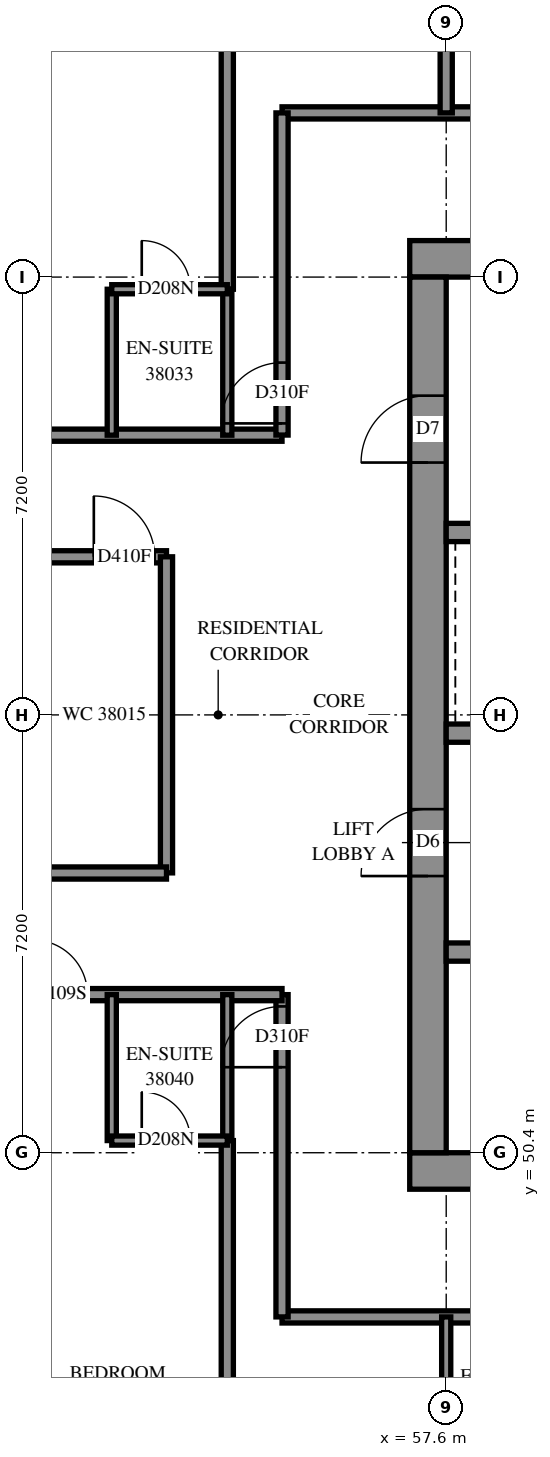
"""IFC4 building model, lengths in metres.
Left out: names, types, materials, properties, quantities, classifications, styles, units other than length and angle.
Written with IfcOpenShell. Run it as: python <this file> out.ifc"""

import sys

from ifc_helpers import new_model, si_unit, direction, frame, frame_2d, origin, place, context, subcontext, project, spatial, rectangle, extrude, element, fill, save


model = new_model("IFC4")
c1 = context("Model", 3, precision=1e-05, world=origin(), true_north=direction((0.0, 1.0)))
c2 = subcontext(c1, "Body", "Model", "MODEL_VIEW")
j1 = project(units=[si_unit("LENGTHUNIT", "METRE"), si_unit("PLANEANGLEUNIT", "RADIAN")], contexts=[c1])
p1 = place(None, origin())
s1 = spatial("IfcSite", under=j1, at=p1, CompositionType="ELEMENT")
p2 = place(p1, origin())
s2 = spatial("IfcBuilding", under=s1, at=p2, CompositionType="ELEMENT")
p3 = place(p2, frame((0.0, 0.0, 142.2)))
s3 = spatial("IfcBuildingStorey", under=s2, at=p3, CompositionType="ELEMENT", Elevation=142.2)
p4 = place(p3, frame((57.0, 50.1, -0.3), z_axis=(0.0, 0.0, 1.0), x_axis=(1.0, 0.0, 0.0)))
e1 = element("IfcWall", 1, at=p4, inside=s3, PredefinedType="SHEAR", context=c2, shape_type="SweptSolid", body=[
    extrude(rectangle(XDim=15.6, YDim=0.6, at=frame_2d((7.8, 0.0))), origin(), (0.0, 0.0, 1.0), 2.7),
])
p5 = place(p3, frame((57.0, 65.1, -0.3), z_axis=(0.0, 0.0, 1.0), x_axis=(1.0, 0.0, 0.0)))
e2 = element("IfcWall", 2, at=p5, inside=s3, PredefinedType="SHEAR", context=c2, shape_type="SweptSolid", body=[
    extrude(rectangle(XDim=15.6, YDim=0.6, at=frame_2d((7.8, 0.0))), origin(), (0.0, 0.0, 1.0), 2.7),
])
p6 = place(p5, frame((10.6, 0.0, 0.3)))
e3 = element("IfcOpeningElement", 3, at=p6, cuts=e2, PredefinedType="OPENING", context=c2, shape_type="SweptSolid", body=[
    extrude(rectangle(XDim=0.8, YDim=2.1, at=frame_2d((0.4, 1.05))), frame((0.0, 0.31, 0.0), z_axis=(0.0, -1.0, 0.0), x_axis=(1.0, 0.0, 0.0)), (0.0, 0.0, 1.0), 0.62),
])
p7 = place(p3, frame((57.3, 50.4, -0.3), z_axis=(0.0, 0.0, 1.0), x_axis=(0.0, 1.0, 0.0)))
e4 = element("IfcWall", 4, at=p7, inside=s3, PredefinedType="SHEAR", context=c2, shape_type="SweptSolid", body=[
    extrude(rectangle(XDim=14.4, YDim=0.6, at=frame_2d((7.2, 0.0))), origin(), (0.0, 0.0, 1.0), 2.7),
])
p8 = place(p7, frame((4.55, 0.0, 0.3)))
e5 = element("IfcOpeningElement", 5, at=p8, cuts=e4, PredefinedType="OPENING", context=c2, shape_type="SweptSolid", body=[
    extrude(rectangle(XDim=1.1, YDim=2.1, at=frame_2d((0.55, 1.05))), frame((0.0, 0.31, 0.0), z_axis=(0.0, -1.0, 0.0), x_axis=(1.0, 0.0, 0.0)), (0.0, 0.0, 1.0), 0.62),
])
p9 = place(p7, frame((11.35, 0.0, 0.3)))
e6 = element("IfcOpeningElement", 6, at=p9, cuts=e4, PredefinedType="OPENING", context=c2, shape_type="SweptSolid", body=[
    extrude(rectangle(XDim=1.1, YDim=2.1, at=frame_2d((0.55, 1.05))), frame((0.0, 0.31, 0.0), z_axis=(0.0, -1.0, 0.0), x_axis=(1.0, 0.0, 0.0)), (0.0, 0.0, 1.0), 0.62),
])
p10 = place(p3, frame((57.6, 53.7, 0.0), z_axis=(0.0, 0.0, 1.0), x_axis=(1.0, 0.0, 0.0)))
e7 = element("IfcWall", 7, at=p10, inside=s3, PredefinedType="SOLIDWALL", context=c2, shape_type="SweptSolid", body=[
    extrude(rectangle(XDim=14.4, YDim=0.3, at=frame_2d((7.2, 0.0))), origin(), (0.0, 0.0, 1.0), 3.1),
])
p11 = place(p10, frame((1.35, 0.0, 0.0)))
e8 = element("IfcOpeningElement", 8, at=p11, cuts=e7, PredefinedType="OPENING", context=c2, shape_type="SweptSolid", body=[
    extrude(rectangle(XDim=0.9, YDim=2.1, at=frame_2d((0.45, 1.05))), frame((0.0, 0.16, 0.0), z_axis=(0.0, -1.0, 0.0), x_axis=(1.0, 0.0, 0.0)), (0.0, 0.0, 1.0), 0.32),
])
p12 = place(p10, frame((4.95, 0.0, 0.0)))
e9 = element("IfcOpeningElement", 9, at=p12, cuts=e7, PredefinedType="OPENING", context=c2, shape_type="SweptSolid", body=[
    extrude(rectangle(XDim=0.9, YDim=2.1, at=frame_2d((0.45, 1.05))), frame((0.0, 0.16, 0.0), z_axis=(0.0, -1.0, 0.0), x_axis=(1.0, 0.0, 0.0)), (0.0, 0.0, 1.0), 0.32),
])
p13 = place(p10, frame((8.55, 0.0, 0.0)))
e10 = element("IfcOpeningElement", 10, at=p13, cuts=e7, PredefinedType="OPENING", context=c2, shape_type="SweptSolid", body=[
    extrude(rectangle(XDim=0.9, YDim=2.1, at=frame_2d((0.45, 1.05))), frame((0.0, 0.16, 0.0), z_axis=(0.0, -1.0, 0.0), x_axis=(1.0, 0.0, 0.0)), (0.0, 0.0, 1.0), 0.32),
])
p14 = place(p10, frame((12.05, 0.0, 0.0)))
e11 = element("IfcOpeningElement", 11, at=p14, cuts=e7, PredefinedType="OPENING", context=c2, shape_type="SweptSolid", body=[
    extrude(rectangle(XDim=1.1, YDim=2.1, at=frame_2d((0.55, 1.05))), frame((0.0, 0.16, 0.0), z_axis=(0.0, -1.0, 0.0), x_axis=(1.0, 0.0, 0.0)), (0.0, 0.0, 1.0), 0.32),
])
p15 = place(p3, frame((57.6, 57.3, 0.0), z_axis=(0.0, 0.0, 1.0), x_axis=(1.0, 0.0, 0.0)))
e12 = element("IfcWall", 12, at=p15, inside=s3, PredefinedType="SOLIDWALL", context=c2, shape_type="SweptSolid", body=[
    extrude(rectangle(XDim=14.4, YDim=0.3, at=frame_2d((7.2, 0.0))), origin(), (0.0, 0.0, 1.0), 3.1),
])
p16 = place(p15, frame((1.25, 0.0, 0.0)))
e13 = element("IfcOpeningElement", 13, at=p16, cuts=e12, PredefinedType="OPENING", context=c2, shape_type="SweptSolid", body=[
    extrude(rectangle(XDim=1.1, YDim=2.1, at=frame_2d((0.55, 1.05))), frame((0.0, 0.16, 0.0), z_axis=(0.0, -1.0, 0.0), x_axis=(1.0, 0.0, 0.0)), (0.0, 0.0, 1.0), 0.32),
])
p17 = place(p15, frame((4.85, 0.0, 0.0)))
e14 = element("IfcOpeningElement", 14, at=p17, cuts=e12, PredefinedType="OPENING", context=c2, shape_type="SweptSolid", body=[
    extrude(rectangle(XDim=1.1, YDim=2.1, at=frame_2d((0.55, 1.05))), frame((0.0, 0.16, 0.0), z_axis=(0.0, -1.0, 0.0), x_axis=(1.0, 0.0, 0.0)), (0.0, 0.0, 1.0), 0.32),
])
p18 = place(p15, frame((8.45, 0.0, 0.0)))
e15 = element("IfcOpeningElement", 15, at=p18, cuts=e12, PredefinedType="OPENING", context=c2, shape_type="SweptSolid", body=[
    extrude(rectangle(XDim=1.1, YDim=2.1, at=frame_2d((0.55, 1.05))), frame((0.0, 0.16, 0.0), z_axis=(0.0, -1.0, 0.0), x_axis=(1.0, 0.0, 0.0)), (0.0, 0.0, 1.0), 0.32),
])
p19 = place(p15, frame((12.05, 0.0, 0.0)))
e16 = element("IfcOpeningElement", 16, at=p19, cuts=e12, PredefinedType="OPENING", context=c2, shape_type="SweptSolid", body=[
    extrude(rectangle(XDim=1.1, YDim=2.1, at=frame_2d((0.55, 1.05))), frame((0.0, 0.16, 0.0), z_axis=(0.0, -1.0, 0.0), x_axis=(1.0, 0.0, 0.0)), (0.0, 0.0, 1.0), 0.32),
])
p20 = place(p3, frame((57.6, 60.6, 0.0), z_axis=(0.0, 0.0, 1.0), x_axis=(1.0, 0.0, 0.0)))
e17 = element("IfcWall", 17, at=p20, inside=s3, PredefinedType="SOLIDWALL", context=c2, shape_type="SweptSolid", body=[
    extrude(rectangle(XDim=7.2, YDim=0.3, at=frame_2d((3.6, 0.0))), origin(), (0.0, 0.0, 1.0), 3.1),
])
p21 = place(p3, frame((54.9, 67.5, 0.0), z_axis=(0.0, 0.0, 1.0), x_axis=(1.0, 0.0, 0.0)))
e18 = element("IfcWall", 18, at=p21, inside=s3, PredefinedType="PARTITIONING", context=c2, shape_type="SweptSolid", body=[
    extrude(rectangle(XDim=19.8, YDim=0.2, at=frame_2d((9.9, 0.0))), origin(), (0.0, 0.0, 1.0), 3.1),
])
p22 = place(p21, frame((6.586, 0.0, 0.0)))
e19 = element("IfcOpeningElement", 19, at=p22, cuts=e18, PredefinedType="OPENING", context=c2, shape_type="SweptSolid", body=[
    extrude(rectangle(XDim=1.0, YDim=2.1, at=frame_2d((0.5, 1.05))), frame((0.0, 0.11, 0.0), z_axis=(0.0, -1.0, 0.0), x_axis=(1.0, 0.0, 0.0)), (0.0, 0.0, 1.0), 0.22),
])
p23 = place(p21, frame((14.089, 0.0, 0.0)))
e20 = element("IfcOpeningElement", 20, at=p23, cuts=e18, PredefinedType="OPENING", context=c2, shape_type="SweptSolid", body=[
    extrude(rectangle(XDim=1.0, YDim=2.1, at=frame_2d((0.5, 1.05))), frame((0.0, 0.11, 0.0), z_axis=(0.0, -1.0, 0.0), x_axis=(1.0, 0.0, 0.0)), (0.0, 0.0, 1.0), 0.22),
])
p24 = place(p3, frame((54.9, 47.7, 0.0), z_axis=(0.0, 0.0, 1.0), x_axis=(1.0, 0.0, 0.0)))
e21 = element("IfcWall", 21, at=p24, inside=s3, PredefinedType="PARTITIONING", context=c2, shape_type="SweptSolid", body=[
    extrude(rectangle(XDim=19.326, YDim=0.2, at=frame_2d((9.663, 0.0))), origin(), (0.0, 0.0, 1.0), 3.1),
])
p25 = place(p24, frame((5.0, 0.0, 0.0)))
e22 = element("IfcOpeningElement", 22, at=p25, cuts=e21, PredefinedType="OPENING", context=c2, shape_type="SweptSolid", body=[
    extrude(rectangle(XDim=0.9, YDim=2.1, at=frame_2d((0.45, 1.05))), frame((0.0, 0.11, 0.0), z_axis=(0.0, -1.0, 0.0), x_axis=(1.0, 0.0, 0.0)), (0.0, 0.0, 1.0), 0.22),
])
p26 = place(p24, frame((12.2, 0.0, 0.0)))
e23 = element("IfcOpeningElement", 23, at=p26, cuts=e21, PredefinedType="OPENING", context=c2, shape_type="SweptSolid", body=[
    extrude(rectangle(XDim=0.9, YDim=2.1, at=frame_2d((0.45, 1.05))), frame((0.0, 0.11, 0.0), z_axis=(0.0, -1.0, 0.0), x_axis=(1.0, 0.0, 0.0)), (0.0, 0.0, 1.0), 0.22),
])
p27 = place(p24, frame((6.7, 0.0, 0.0)))
e24 = element("IfcOpeningElement", 24, at=p27, cuts=e21, PredefinedType="OPENING", context=c2, shape_type="SweptSolid", body=[
    extrude(rectangle(XDim=0.9, YDim=2.1, at=frame_2d((0.45, 1.05))), frame((0.0, 0.11, 0.0), z_axis=(0.0, -1.0, 0.0), x_axis=(1.0, 0.0, 0.0)), (0.0, 0.0, 1.0), 0.22),
])
p28 = place(p24, frame((13.9, 0.0, 0.0)))
e25 = element("IfcOpeningElement", 25, at=p28, cuts=e21, PredefinedType="OPENING", context=c2, shape_type="SweptSolid", body=[
    extrude(rectangle(XDim=0.9, YDim=2.1, at=frame_2d((0.45, 1.05))), frame((0.0, 0.11, 0.0), z_axis=(0.0, -1.0, 0.0), x_axis=(1.0, 0.0, 0.0)), (0.0, 0.0, 1.0), 0.22),
])
p29 = place(p3, frame((36.0, 60.2, 0.0), z_axis=(0.0, 0.0, 1.0), x_axis=(1.0, 0.0, 0.0)))
e26 = element("IfcWall", 26, at=p29, inside=s3, PredefinedType="PARTITIONING", context=c2, shape_type="SweptSolid", body=[
    extrude(rectangle(XDim=17.0, YDim=0.2, at=frame_2d((8.5, 0.0))), origin(), (0.0, 0.0, 1.0), 3.1),
])
p30 = place(p29, frame((15.805, 0.0, 0.0)))
e27 = element("IfcOpeningElement", 27, at=p30, cuts=e26, PredefinedType="OPENING", context=c2, shape_type="SweptSolid", body=[
    extrude(rectangle(XDim=1.0, YDim=2.1, at=frame_2d((0.5, 1.05))), frame((0.0, 0.11, 0.0), z_axis=(0.0, -1.0, 0.0), x_axis=(1.0, 0.0, 0.0)), (0.0, 0.0, 1.0), 0.22),
])
p31 = place(p29, frame((4.125, 0.0, 0.0)))
e28 = element("IfcOpeningElement", 28, at=p31, cuts=e26, PredefinedType="OPENING", context=c2, shape_type="SweptSolid", body=[
    extrude(rectangle(XDim=1.0, YDim=2.1, at=frame_2d((0.5, 1.05))), frame((0.0, 0.11, 0.0), z_axis=(0.0, -1.0, 0.0), x_axis=(1.0, 0.0, 0.0)), (0.0, 0.0, 1.0), 0.22),
])
p32 = place(p29, frame((7.55, 0.0, 0.0)))
e29 = element("IfcOpeningElement", 29, at=p32, cuts=e26, PredefinedType="OPENING", context=c2, shape_type="SweptSolid", body=[
    extrude(rectangle(XDim=0.9, YDim=2.1, at=frame_2d((0.45, 1.05))), frame((0.0, 0.11, 0.0), z_axis=(0.0, -1.0, 0.0), x_axis=(1.0, 0.0, 0.0)), (0.0, 0.0, 1.0), 0.22),
])
p33 = place(p29, frame((11.635, 0.0, 0.0)))
e30 = element("IfcOpeningElement", 30, at=p33, cuts=e26, PredefinedType="OPENING", context=c2, shape_type="SweptSolid", body=[
    extrude(rectangle(XDim=1.0, YDim=2.1, at=frame_2d((0.5, 1.05))), frame((0.0, 0.11, 0.0), z_axis=(0.0, -1.0, 0.0), x_axis=(1.0, 0.0, 0.0)), (0.0, 0.0, 1.0), 0.22),
])
p34 = place(p3, frame((40.602, 62.2, 0.0), z_axis=(0.0, 0.0, 1.0), x_axis=(1.0, 0.0, 0.0)))
e31 = element("IfcWall", 31, at=p34, inside=s3, PredefinedType="PARTITIONING", context=c2, shape_type="SweptSolid", body=[
    extrude(rectangle(XDim=14.298, YDim=0.2, at=frame_2d((7.149, 0.0))), origin(), (0.0, 0.0, 1.0), 3.1),
])
p35 = place(p34, frame((1.306, 0.0, 0.0)))
e32 = element("IfcOpeningElement", 32, at=p35, cuts=e31, PredefinedType="OPENING", context=c2, shape_type="SweptSolid", body=[
    extrude(rectangle(XDim=0.9, YDim=2.1, at=frame_2d((0.45, 1.05))), frame((0.0, 0.11, 0.0), z_axis=(0.0, -1.0, 0.0), x_axis=(1.0, 0.0, 0.0)), (0.0, 0.0, 1.0), 0.22),
])
p36 = place(p34, frame((8.455, 0.0, 0.0)))
e33 = element("IfcOpeningElement", 33, at=p36, cuts=e31, PredefinedType="OPENING", context=c2, shape_type="SweptSolid", body=[
    extrude(rectangle(XDim=0.9, YDim=2.1, at=frame_2d((0.45, 1.05))), frame((0.0, 0.11, 0.0), z_axis=(0.0, -1.0, 0.0), x_axis=(1.0, 0.0, 0.0)), (0.0, 0.0, 1.0), 0.22),
])
p37 = place(p3, frame((54.0, 42.357, 0.0), z_axis=(0.0, 0.0, 1.0), x_axis=(0.0, 1.0, 0.0)))
e34 = element("IfcWall", 34, at=p37, inside=s3, PredefinedType="PARTITIONING", context=c2, shape_type="SweptSolid", body=[
    extrude(rectangle(XDim=8.243, YDim=0.2, at=frame_2d((4.122, 0.0))), origin(), (0.0, 0.0, 1.0), 3.1),
])
p38 = place(p3, frame((54.0, 64.6, 0.0), z_axis=(0.0, 0.0, 1.0), x_axis=(0.0, 1.0, 0.0)))
e35 = element("IfcWall", 35, at=p38, inside=s3, PredefinedType="PARTITIONING", context=c2, shape_type="SweptSolid", body=[
    extrude(rectangle(XDim=8.14, YDim=0.2, at=frame_2d((4.07, 0.0))), origin(), (0.0, 0.0, 1.0), 3.1),
])
p39 = place(p3, frame((54.9, 47.7, 0.0), z_axis=(0.0, 0.0, 1.0), x_axis=(0.0, 1.0, 0.0)))
e36 = element("IfcWall", 36, at=p39, inside=s3, PredefinedType="PARTITIONING", context=c2, shape_type="SweptSolid", body=[
    extrude(rectangle(XDim=5.3, YDim=0.2, at=frame_2d((2.65, 0.0))), origin(), (0.0, 0.0, 1.0), 3.1),
])
p40 = place(p39, frame((4.106, 0.0, 0.0)))
e37 = element("IfcOpeningElement", 37, at=p40, cuts=e36, PredefinedType="OPENING", context=c2, shape_type="SweptSolid", body=[
    extrude(rectangle(XDim=1.0, YDim=2.1, at=frame_2d((0.5, 1.05))), frame((0.0, 0.11, 0.0), z_axis=(0.0, -1.0, 0.0), x_axis=(1.0, 0.0, 0.0)), (0.0, 0.0, 1.0), 0.22),
])
p41 = place(p3, frame((54.9, 62.202, 0.0), z_axis=(0.0, 0.0, 1.0), x_axis=(0.0, 1.0, 0.0)))
e38 = element("IfcWall", 38, at=p41, inside=s3, PredefinedType="PARTITIONING", context=c2, shape_type="SweptSolid", body=[
    extrude(rectangle(XDim=5.298, YDim=0.2, at=frame_2d((2.649, 0.0))), origin(), (0.0, 0.0, 1.0), 3.1),
])
p42 = place(p41, frame((0.192, 0.0, 0.0)))
e39 = element("IfcOpeningElement", 39, at=p42, cuts=e38, PredefinedType="OPENING", context=c2, shape_type="SweptSolid", body=[
    extrude(rectangle(XDim=1.0, YDim=2.1, at=frame_2d((0.5, 1.05))), frame((0.0, 0.11, 0.0), z_axis=(0.0, -1.0, 0.0), x_axis=(1.0, 0.0, 0.0)), (0.0, 0.0, 1.0), 0.22),
])
p43 = place(p3, frame((53.0, 55.002, 0.0), z_axis=(0.0, 0.0, 1.0), x_axis=(0.0, 1.0, 0.0)))
e40 = element("IfcWall", 40, at=p43, inside=s3, PredefinedType="PARTITIONING", context=c2, shape_type="SweptSolid", body=[
    extrude(rectangle(XDim=5.198, YDim=0.2, at=frame_2d((2.599, 0.0))), origin(), (0.0, 0.0, 1.0), 3.1),
])
p44 = place(p3, frame((50.4, 53.0, 0.0), z_axis=(0.0, 0.0, 1.0), x_axis=(1.0, 0.0, 0.0)))
e41 = element("IfcWall", 41, at=p44, inside=s3, PredefinedType="PARTITIONING", context=c2, shape_type="SweptSolid", body=[
    extrude(rectangle(XDim=4.5, YDim=0.2, at=frame_2d((2.25, 0.0))), origin(), (0.0, 0.0, 1.0), 3.1),
])
p45 = place(p44, frame((0.4, 0.0, 0.0)))
e42 = element("IfcOpeningElement", 42, at=p45, cuts=e41, PredefinedType="OPENING", context=c2, shape_type="SweptSolid", body=[
    extrude(rectangle(XDim=0.9, YDim=2.1, at=frame_2d((0.45, 1.05))), frame((0.0, 0.11, 0.0), z_axis=(0.0, -1.0, 0.0), x_axis=(1.0, 0.0, 0.0)), (0.0, 0.0, 1.0), 0.22),
])
p46 = place(p3, frame((57.6, 67.5, 0.0), z_axis=(0.0, 0.0, 1.0), x_axis=(0.0, 1.0, 0.0)))
e43 = element("IfcWall", 43, at=p46, inside=s3, PredefinedType="PARTITIONING", context=c2, shape_type="SweptSolid", body=[
    extrude(rectangle(XDim=4.05, YDim=0.2, at=frame_2d((2.025, 0.0))), origin(), (0.0, 0.0, 1.0), 3.1),
])
p47 = place(p3, frame((50.4, 55.0, 0.0), z_axis=(0.0, 0.0, 1.0), x_axis=(1.0, 0.0, 0.0)))
e44 = element("IfcWall", 44, at=p47, inside=s3, PredefinedType="PARTITIONING", context=c2, shape_type="SweptSolid", body=[
    extrude(rectangle(XDim=2.6, YDim=0.2, at=frame_2d((1.3, 0.0))), origin(), (0.0, 0.0, 1.0), 3.1),
])
for number, where, z_axis, x_axis in (
    (45, (57.6, 45.3, 0.0), (0.0, 0.0, 1.0), (0.0, 1.0, 0.0)),
    (46, (52.1, 50.6, 0.0), (0.0, 0.0, 1.0), (0.0, 1.0, 0.0)),
    (47, (54.0, 50.6, 0.0), (0.0, 0.0, 1.0), (0.0, 1.0, 0.0)),
    (48, (52.1, 62.2, 0.0), (0.0, 0.0, 1.0), (0.0, 1.0, 0.0)),
    (49, (54.0, 62.2, 0.0), (0.0, 0.0, 1.0), (0.0, 1.0, 0.0)),
):
    element("IfcWall", number, at=place(p3, frame(where, z_axis=z_axis, x_axis=x_axis)), inside=s3, PredefinedType="PARTITIONING", context=c2, shape_type="SweptSolid", body=[
        extrude(rectangle(XDim=2.4, YDim=0.15, at=frame_2d((1.2, 0.0))), origin(), (0.0, 0.0, 1.0), 3.1),
    ])
p48 = place(p3, frame((52.1, 64.6, 0.0), z_axis=(0.0, 0.0, 1.0), x_axis=(1.0, 0.0, 0.0)))
e50 = element("IfcWall", 50, at=p48, inside=s3, PredefinedType="PARTITIONING", context=c2, shape_type="SweptSolid", body=[
    extrude(rectangle(XDim=1.9, YDim=0.15, at=frame_2d((0.95, 0.0))), origin(), (0.0, 0.0, 1.0), 3.1),
])
p49 = place(p48, frame((0.493, 0.0, 0.0)))
e51 = element("IfcOpeningElement", 51, at=p49, cuts=e50, PredefinedType="OPENING", context=c2, shape_type="SweptSolid", body=[
    extrude(rectangle(XDim=0.8, YDim=2.1, at=frame_2d((0.4, 1.05))), frame((0.0, 0.085, 0.0), z_axis=(0.0, -1.0, 0.0), x_axis=(1.0, 0.0, 0.0)), (0.0, 0.0, 1.0), 0.17),
])
p50 = place(p3, frame((52.1, 50.6, 0.0), z_axis=(0.0, 0.0, 1.0), x_axis=(1.0, 0.0, 0.0)))
e52 = element("IfcWall", 52, at=p50, inside=s3, PredefinedType="PARTITIONING", context=c2, shape_type="SweptSolid", body=[
    extrude(rectangle(XDim=1.9, YDim=0.15, at=frame_2d((0.95, 0.0))), origin(), (0.0, 0.0, 1.0), 3.1),
])
p51 = place(p50, frame((0.493, 0.0, 0.0)))
e53 = element("IfcOpeningElement", 53, at=p51, cuts=e52, PredefinedType="OPENING", context=c2, shape_type="SweptSolid", body=[
    extrude(rectangle(XDim=0.8, YDim=2.1, at=frame_2d((0.4, 1.05))), frame((0.0, 0.085, 0.0), z_axis=(0.0, -1.0, 0.0), x_axis=(1.0, 0.0, 0.0)), (0.0, 0.0, 1.0), 0.17),
])
p52 = place(p8, origin())
e54 = element("IfcDoor", 54, at=p52, inside=s3, OperationType="DOUBLE_DOOR_SINGLE_SWING", PredefinedType="DOOR", context=c2, shape_type="SweptSolid", body=[
    extrude(rectangle(XDim=1.1, YDim=2.1, at=frame_2d((0.55, 1.05))), frame((0.0, 0.025, 0.0), z_axis=(0.0, -1.0, 0.0), x_axis=(1.0, 0.0, 0.0)), (0.0, 0.0, 1.0), 0.05),
])
fill(e5, e54)
p53 = place(p9, origin())
e55 = element("IfcDoor", 55, at=p53, inside=s3, OperationType="SINGLE_SWING_LEFT", PredefinedType="DOOR", context=c2, shape_type="SweptSolid", body=[
    extrude(rectangle(XDim=1.1, YDim=2.1, at=frame_2d((0.55, 1.05))), frame((0.0, 0.025, 0.0), z_axis=(0.0, -1.0, 0.0), x_axis=(1.0, 0.0, 0.0)), (0.0, 0.0, 1.0), 0.05),
])
fill(e6, e55)
p54 = place(p30, origin())
e56 = element("IfcDoor", 56, at=p54, inside=s3, OperationType="SINGLE_SWING_LEFT", PredefinedType="DOOR", context=c2, shape_type="SweptSolid", body=[
    extrude(rectangle(XDim=1.0, YDim=2.1, at=frame_2d((0.5, 1.05))), frame((0.0, 0.025, 0.0), z_axis=(0.0, -1.0, 0.0), x_axis=(1.0, 0.0, 0.0)), (0.0, 0.0, 1.0), 0.05),
])
fill(e27, e56)
p55 = place(p49, origin())
e57 = element("IfcDoor", 57, at=p55, inside=s3, OperationType="SINGLE_SWING_RIGHT", PredefinedType="DOOR", context=c2, shape_type="SweptSolid", body=[
    extrude(rectangle(XDim=0.8, YDim=2.1, at=frame_2d((0.4, 1.05))), frame((0.0, 0.025, 0.0), z_axis=(0.0, -1.0, 0.0), x_axis=(1.0, 0.0, 0.0)), (0.0, 0.0, 1.0), 0.05),
])
fill(e51, e57)
p56 = place(p42, origin())
e58 = element("IfcDoor", 58, at=p56, inside=s3, OperationType="SINGLE_SWING_LEFT", PredefinedType="DOOR", context=c2, shape_type="SweptSolid", body=[
    extrude(rectangle(XDim=1.0, YDim=2.1, at=frame_2d((0.5, 1.05))), frame((0.0, 0.025, 0.0), z_axis=(0.0, -1.0, 0.0), x_axis=(1.0, 0.0, 0.0)), (0.0, 0.0, 1.0), 0.05),
])
fill(e39, e58)
p57 = place(p45, origin())
e59 = element("IfcDoor", 59, at=p57, inside=s3, OperationType="SINGLE_SWING_LEFT", PredefinedType="DOOR", context=c2, shape_type="SweptSolid", body=[
    extrude(rectangle(XDim=0.9, YDim=2.1, at=frame_2d((0.45, 1.05))), frame((0.0, 0.025, 0.0), z_axis=(0.0, -1.0, 0.0), x_axis=(1.0, 0.0, 0.0)), (0.0, 0.0, 1.0), 0.05),
])
fill(e42, e59)
p58 = place(p51, origin())
e60 = element("IfcDoor", 60, at=p58, inside=s3, OperationType="SINGLE_SWING_RIGHT", PredefinedType="DOOR", context=c2, shape_type="SweptSolid", body=[
    extrude(rectangle(XDim=0.8, YDim=2.1, at=frame_2d((0.4, 1.05))), frame((0.0, 0.025, 0.0), z_axis=(0.0, -1.0, 0.0), x_axis=(1.0, 0.0, 0.0)), (0.0, 0.0, 1.0), 0.05),
])
fill(e53, e60)
p59 = place(p40, origin())
e61 = element("IfcDoor", 61, at=p59, inside=s3, OperationType="SINGLE_SWING_RIGHT", PredefinedType="DOOR", context=c2, shape_type="SweptSolid", body=[
    extrude(rectangle(XDim=1.0, YDim=2.1, at=frame_2d((0.5, 1.05))), frame((0.0, 0.025, 0.0), z_axis=(0.0, -1.0, 0.0), x_axis=(1.0, 0.0, 0.0)), (0.0, 0.0, 1.0), 0.05),
])
fill(e37, e61)
save(model, sys.argv[1])
